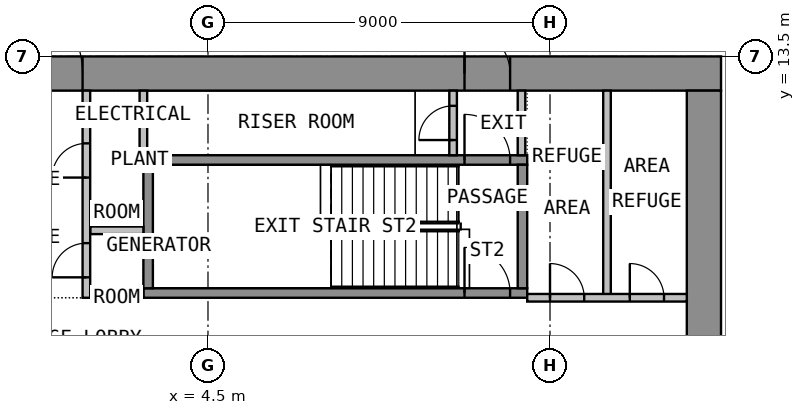
"""IFC4 building model, lengths in metres.
Left out: names, types, materials, properties, quantities, classifications, styles, units other than length and angle.
Written with IfcOpenShell. Run it as: python <this file> out.ifc"""

import sys

from ifc_helpers import new_model, si_unit, direction, frame, frame_2d, origin, place, context, subcontext, project, spatial, rectangle, extrude, element, fill, save


model = new_model("IFC4")
c1 = context("Model", 3, precision=1e-05, world=origin(), true_north=direction((0.0, 1.0)))
c2 = subcontext(c1, "Body", "Model", "MODEL_VIEW")
j1 = project(units=[si_unit("LENGTHUNIT", "METRE"), si_unit("PLANEANGLEUNIT", "RADIAN")], contexts=[c1])
p1 = place(None, origin())
s1 = spatial("IfcSite", under=j1, at=p1, CompositionType="ELEMENT")
p2 = place(p1, origin())
s2 = spatial("IfcBuilding", under=s1, at=p2, CompositionType="ELEMENT")
p3 = place(p2, frame((0.0, 0.0, 76.8)))
s3 = spatial("IfcBuildingStorey", under=s2, at=p3, CompositionType="ELEMENT", Elevation=76.8)
p4 = place(p3, frame((-18.0, 13.05, 0.0), z_axis=(0.0, 0.0, 1.0), x_axis=(1.0, 0.0, 0.0)))
e1 = element("IfcWall", 1, at=p4, inside=s3, PredefinedType="SHEAR", context=c2, shape_type="SweptSolid", body=[
    extrude(rectangle(XDim=36.0, YDim=0.9, at=frame_2d((18.0, 0.0))), origin(), (0.0, 0.0, 1.0), 4.125),
])
p5 = place(p4, frame((16.8, 0.0, 0.0)))
e2 = element("IfcOpeningElement", 2, at=p5, cuts=e1, PredefinedType="OPENING", context=c2, shape_type="SweptSolid", body=[
    extrude(rectangle(XDim=2.4, YDim=2.1, at=frame_2d((1.2, 1.05))), frame((0.0, 0.46, 0.0), z_axis=(0.0, -1.0, 0.0), x_axis=(1.0, 0.0, 0.0)), (0.0, 0.0, 1.0), 0.92),
])
p6 = place(p4, frame((5.55, 0.0, 0.0)))
e3 = element("IfcOpeningElement", 3, at=p6, cuts=e1, PredefinedType="OPENING", context=c2, shape_type="SweptSolid", body=[
    extrude(rectangle(XDim=1.2, YDim=2.1, at=frame_2d((0.6, 1.05))), frame((0.0, 0.46, 0.0), z_axis=(0.0, -1.0, 0.0), x_axis=(1.0, 0.0, 0.0)), (0.0, 0.0, 1.0), 0.92),
])
p7 = place(p4, frame((29.25, 0.0, 0.0)))
e4 = element("IfcOpeningElement", 4, at=p7, cuts=e1, PredefinedType="OPENING", context=c2, shape_type="SweptSolid", body=[
    extrude(rectangle(XDim=1.2, YDim=2.1, at=frame_2d((0.6, 1.05))), frame((0.0, 0.46, 0.0), z_axis=(0.0, -1.0, 0.0), x_axis=(1.0, 0.0, 0.0)), (0.0, 0.0, 1.0), 0.92),
])
p8 = place(p3, frame((17.55, -12.6, 0.0), z_axis=(0.0, 0.0, 1.0), x_axis=(0.0, 1.0, 0.0)))
e5 = element("IfcWall", 5, at=p8, inside=s3, PredefinedType="SHEAR", context=c2, shape_type="SweptSolid", body=[
    extrude(rectangle(XDim=25.2, YDim=0.9, at=frame_2d((12.6, 0.0))), origin(), (0.0, 0.0, 1.0), 4.125),
])
p9 = place(p8, frame((11.4, 0.0, 0.0)))
e6 = element("IfcOpeningElement", 6, at=p9, cuts=e5, PredefinedType="OPENING", context=c2, shape_type="SweptSolid", body=[
    extrude(rectangle(XDim=2.4, YDim=2.1, at=frame_2d((1.2, 1.05))), frame((0.0, 0.46, 0.0), z_axis=(0.0, -1.0, 0.0), x_axis=(1.0, 0.0, 0.0)), (0.0, 0.0, 1.0), 0.92),
])
p10 = place(p3, frame((2.8, 7.275, 0.0), z_axis=(0.0, 0.0, 1.0), x_axis=(1.0, 0.0, 0.0)))
e7 = element("IfcWall", 7, at=p10, inside=s3, PredefinedType="SHEAR", context=c2, shape_type="SweptSolid", body=[
    extrude(rectangle(XDim=10.1, YDim=0.25, at=frame_2d((5.05, 0.0))), origin(), (0.0, 0.0, 1.0), 4.125),
])
p11 = place(p10, frame((8.45, 0.0, 0.0)))
e8 = element("IfcOpeningElement", 8, at=p11, cuts=e7, PredefinedType="OPENING", context=c2, shape_type="SweptSolid", body=[
    extrude(rectangle(XDim=1.2, YDim=2.1, at=frame_2d((0.6, 1.05))), frame((0.0, 0.135, 0.0), z_axis=(0.0, -1.0, 0.0), x_axis=(1.0, 0.0, 0.0)), (0.0, 0.0, 1.0), 0.27),
])
p12 = place(p3, frame((2.8, 10.775, 0.0), z_axis=(0.0, 0.0, 1.0), x_axis=(1.0, 0.0, 0.0)))
e9 = element("IfcWall", 9, at=p12, inside=s3, PredefinedType="SHEAR", context=c2, shape_type="SweptSolid", body=[
    extrude(rectangle(XDim=10.1, YDim=0.25, at=frame_2d((5.05, 0.0))), origin(), (0.0, 0.0, 1.0), 4.125),
])
p13 = place(p12, frame((8.45, 0.0, 0.0)))
e10 = element("IfcOpeningElement", 10, at=p13, cuts=e9, PredefinedType="OPENING", context=c2, shape_type="SweptSolid", body=[
    extrude(rectangle(XDim=1.2, YDim=2.1, at=frame_2d((0.6, 1.05))), frame((0.0, 0.135, 0.0), z_axis=(0.0, -1.0, 0.0), x_axis=(1.0, 0.0, 0.0)), (0.0, 0.0, 1.0), 0.27),
])
for number, where, z_axis, x_axis in (
    (11, (2.925, 7.4, 0.0), (0.0, 0.0, 1.0), (0.0, 1.0, 0.0)),
    (12, (12.775, 7.4, 0.0), (0.0, 0.0, 1.0), (0.0, 1.0, 0.0)),
):
    element("IfcWall", number, at=place(p3, frame(where, z_axis=z_axis, x_axis=x_axis)), inside=s3, PredefinedType="SHEAR", context=c2, shape_type="SweptSolid", body=[
        extrude(rectangle(XDim=3.25, YDim=0.25, at=frame_2d((1.625, 0.0))), origin(), (0.0, 0.0, 1.0), 4.125),
    ])
for number, where, z_axis, x_axis in (
    (13, (1.4, 7.25, 0.0), (0.0, 0.0, 1.0), (1.0, 0.0, 0.0)),
    (14, (1.4, 8.925, 0.0), (0.0, 0.0, 1.0), (1.0, 0.0, 0.0)),
):
    element("IfcWall", number, at=place(p3, frame(where, z_axis=z_axis, x_axis=x_axis)), inside=s3, PredefinedType="PARTITIONING", context=c2, shape_type="SweptSolid", body=[
        extrude(rectangle(XDim=1.4, YDim=0.2, at=frame_2d((0.7, 0.0))), origin(), (0.0, 0.0, 1.0), 4.125),
    ])
p14 = place(p3, frame((1.3, 7.15, 0.0), z_axis=(0.0, 0.0, 1.0), x_axis=(0.0, 1.0, 0.0)))
e15 = element("IfcWall", 15, at=p14, inside=s3, PredefinedType="PARTITIONING", context=c2, shape_type="SweptSolid", body=[
    extrude(rectangle(XDim=5.45, YDim=0.2, at=frame_2d((2.725, 0.0))), origin(), (0.0, 0.0, 1.0), 4.125),
])
p15 = place(p14, frame((0.538, 0.0, 0.0)))
e16 = element("IfcOpeningElement", 16, at=p15, cuts=e15, PredefinedType="OPENING", context=c2, shape_type="SweptSolid", body=[
    extrude(rectangle(XDim=0.9, YDim=2.1, at=frame_2d((0.45, 1.05))), frame((0.0, 0.11, 0.0), z_axis=(0.0, -1.0, 0.0), x_axis=(1.0, 0.0, 0.0)), (0.0, 0.0, 1.0), 0.22),
])
p16 = place(p14, frame((3.163, 0.0, 0.0)))
e17 = element("IfcOpeningElement", 17, at=p16, cuts=e15, PredefinedType="OPENING", context=c2, shape_type="SweptSolid", body=[
    extrude(rectangle(XDim=0.9, YDim=2.1, at=frame_2d((0.45, 1.05))), frame((0.0, 0.11, 0.0), z_axis=(0.0, -1.0, 0.0), x_axis=(1.0, 0.0, 0.0)), (0.0, 0.0, 1.0), 0.22),
])
p17 = place(p3, frame((12.75, 10.9, 0.0), z_axis=(0.0, 0.0, 1.0), x_axis=(0.0, 1.0, 0.0)))
e18 = element("IfcWall", 18, at=p17, inside=s3, PredefinedType="PARTITIONING", context=c2, shape_type="SweptSolid", body=[
    extrude(rectangle(XDim=1.7, YDim=0.2, at=frame_2d((0.85, 0.0))), origin(), (0.0, 0.0, 1.0), 4.125),
])
p18 = place(p3, frame((10.95, 10.9, 0.0), z_axis=(0.0, 0.0, 1.0), x_axis=(0.0, 1.0, 0.0)))
e19 = element("IfcWall", 19, at=p18, inside=s3, PredefinedType="PARTITIONING", context=c2, shape_type="SweptSolid", body=[
    extrude(rectangle(XDim=1.7, YDim=0.2, at=frame_2d((0.85, 0.0))), origin(), (0.0, 0.0, 1.0), 4.125),
])
p19 = place(p18, frame((0.4, 0.0, 0.0)))
e20 = element("IfcOpeningElement", 20, at=p19, cuts=e19, PredefinedType="OPENING", context=c2, shape_type="SweptSolid", body=[
    extrude(rectangle(XDim=0.9, YDim=2.1, at=frame_2d((0.45, 1.05))), frame((0.0, 0.11, 0.0), z_axis=(0.0, -1.0, 0.0), x_axis=(1.0, 0.0, 0.0)), (0.0, 0.0, 1.0), 0.22),
])
p20 = place(p3, frame((15.0, 7.15, 0.0), z_axis=(0.0, 0.0, 1.0), x_axis=(0.0, 1.0, 0.0)))
e21 = element("IfcWall", 21, at=p20, inside=s3, PredefinedType="PARTITIONING", context=c2, shape_type="SweptSolid", body=[
    extrude(rectangle(XDim=5.45, YDim=0.2, at=frame_2d((2.725, 0.0))), origin(), (0.0, 0.0, 1.0), 4.125),
])
p21 = place(p3, frame((12.9, 7.15, 0.0), z_axis=(0.0, 0.0, 1.0), x_axis=(1.0, 0.0, 0.0)))
e22 = element("IfcWall", 22, at=p21, inside=s3, PredefinedType="PARTITIONING", context=c2, shape_type="SweptSolid", body=[
    extrude(rectangle(XDim=4.2, YDim=0.2, at=frame_2d((2.1, 0.0))), origin(), (0.0, 0.0, 1.0), 4.125),
])
p22 = place(p21, frame((0.6, 0.0, 0.0)))
e23 = element("IfcOpeningElement", 23, at=p22, cuts=e22, PredefinedType="OPENING", context=c2, shape_type="SweptSolid", body=[
    extrude(rectangle(XDim=0.9, YDim=2.1, at=frame_2d((0.45, 1.05))), frame((0.0, 0.11, 0.0), z_axis=(0.0, -1.0, 0.0), x_axis=(1.0, 0.0, 0.0)), (0.0, 0.0, 1.0), 0.22),
])
p23 = place(p21, frame((2.7, 0.0, 0.0)))
e24 = element("IfcOpeningElement", 24, at=p23, cuts=e22, PredefinedType="OPENING", context=c2, shape_type="SweptSolid", body=[
    extrude(rectangle(XDim=0.9, YDim=2.1, at=frame_2d((0.45, 1.05))), frame((0.0, 0.11, 0.0), z_axis=(0.0, -1.0, 0.0), x_axis=(1.0, 0.0, 0.0)), (0.0, 0.0, 1.0), 0.22),
])
p24 = place(p3, frame((2.8, 12.599, 0.0), z_axis=(0.0, 0.0, 1.0), x_axis=(0.0, -1.0, 0.0)))
e25 = element("IfcWall", 25, at=p24, inside=s3, PredefinedType="PARTITIONING", context=c2, shape_type="SweptSolid", body=[
    extrude(rectangle(XDim=1.698, YDim=0.2, at=frame_2d((0.849, 0.0))), origin(), (0.0, 0.0, 1.0), 4.125),
])
p25 = place(p5, origin())
e26 = element("IfcDoor", 26, at=p25, inside=s3, OperationType="DOUBLE_DOOR_DOUBLE_SWING", PredefinedType="DOOR", context=c2, shape_type="SweptSolid", body=[
    extrude(rectangle(XDim=2.4, YDim=2.1, at=frame_2d((1.2, 1.05))), frame((0.0, 0.025, 0.0), z_axis=(0.0, -1.0, 0.0), x_axis=(1.0, 0.0, 0.0)), (0.0, 0.0, 1.0), 0.05),
])
fill(e2, e26)
p26 = place(p7, origin())
e27 = element("IfcDoor", 27, at=p26, inside=s3, OperationType="SINGLE_SWING_RIGHT", PredefinedType="DOOR", context=c2, shape_type="SweptSolid", body=[
    extrude(rectangle(XDim=1.2, YDim=2.1, at=frame_2d((0.6, 1.05))), frame((0.0, 0.025, 0.0), z_axis=(0.0, -1.0, 0.0), x_axis=(1.0, 0.0, 0.0)), (0.0, 0.0, 1.0), 0.05),
])
fill(e4, e27)
p27 = place(p11, origin())
e28 = element("IfcDoor", 28, at=p27, inside=s3, OperationType="SINGLE_SWING_LEFT", PredefinedType="DOOR", context=c2, shape_type="SweptSolid", body=[
    extrude(rectangle(XDim=1.2, YDim=2.1, at=frame_2d((0.6, 1.05))), frame((0.0, 0.025, 0.0), z_axis=(0.0, -1.0, 0.0), x_axis=(1.0, 0.0, 0.0)), (0.0, 0.0, 1.0), 0.05),
])
fill(e8, e28)
p28 = place(p15, origin())
e29 = element("IfcDoor", 29, at=p28, inside=s3, OperationType="SINGLE_SWING_LEFT", PredefinedType="DOOR", context=c2, shape_type="SweptSolid", body=[
    extrude(rectangle(XDim=0.9, YDim=2.1, at=frame_2d((0.45, 1.05))), frame((0.0, 0.025, 0.0), z_axis=(0.0, -1.0, 0.0), x_axis=(1.0, 0.0, 0.0)), (0.0, 0.0, 1.0), 0.05),
])
fill(e16, e29)
p29 = place(p16, origin())
e30 = element("IfcDoor", 30, at=p29, inside=s3, OperationType="SINGLE_SWING_LEFT", PredefinedType="DOOR", context=c2, shape_type="SweptSolid", body=[
    extrude(rectangle(XDim=0.9, YDim=2.1, at=frame_2d((0.45, 1.05))), frame((0.0, 0.025, 0.0), z_axis=(0.0, -1.0, 0.0), x_axis=(1.0, 0.0, 0.0)), (0.0, 0.0, 1.0), 0.05),
])
fill(e17, e30)
p30 = place(p13, origin())
e31 = element("IfcDoor", 31, at=p30, inside=s3, OperationType="SINGLE_SWING_RIGHT", PredefinedType="DOOR", context=c2, shape_type="SweptSolid", body=[
    extrude(rectangle(XDim=1.2, YDim=2.1, at=frame_2d((0.6, 1.05))), frame((0.0, 0.025, 0.0), z_axis=(0.0, -1.0, 0.0), x_axis=(1.0, 0.0, 0.0)), (0.0, 0.0, 1.0), 0.05),
])
fill(e10, e31)
p31 = place(p19, origin())
e32 = element("IfcDoor", 32, at=p31, inside=s3, OperationType="SINGLE_SWING_LEFT", PredefinedType="DOOR", context=c2, shape_type="SweptSolid", body=[
    extrude(rectangle(XDim=0.9, YDim=2.1, at=frame_2d((0.45, 1.05))), frame((0.0, 0.025, 0.0), z_axis=(0.0, -1.0, 0.0), x_axis=(1.0, 0.0, 0.0)), (0.0, 0.0, 1.0), 0.05),
])
fill(e20, e32)
p32 = place(p22, origin())
e33 = element("IfcDoor", 33, at=p32, inside=s3, OperationType="SINGLE_SWING_LEFT", PredefinedType="DOOR", context=c2, shape_type="SweptSolid", body=[
    extrude(rectangle(XDim=0.9, YDim=2.1, at=frame_2d((0.45, 1.05))), frame((0.0, 0.025, 0.0), z_axis=(0.0, -1.0, 0.0), x_axis=(1.0, 0.0, 0.0)), (0.0, 0.0, 1.0), 0.05),
])
fill(e23, e33)
p33 = place(p23, origin())
e34 = element("IfcDoor", 34, at=p33, inside=s3, OperationType="SINGLE_SWING_LEFT", PredefinedType="DOOR", context=c2, shape_type="SweptSolid", body=[
    extrude(rectangle(XDim=0.9, YDim=2.1, at=frame_2d((0.45, 1.05))), frame((0.0, 0.025, 0.0), z_axis=(0.0, -1.0, 0.0), x_axis=(1.0, 0.0, 0.0)), (0.0, 0.0, 1.0), 0.05),
])
fill(e24, e34)
save(model, sys.argv[1])
